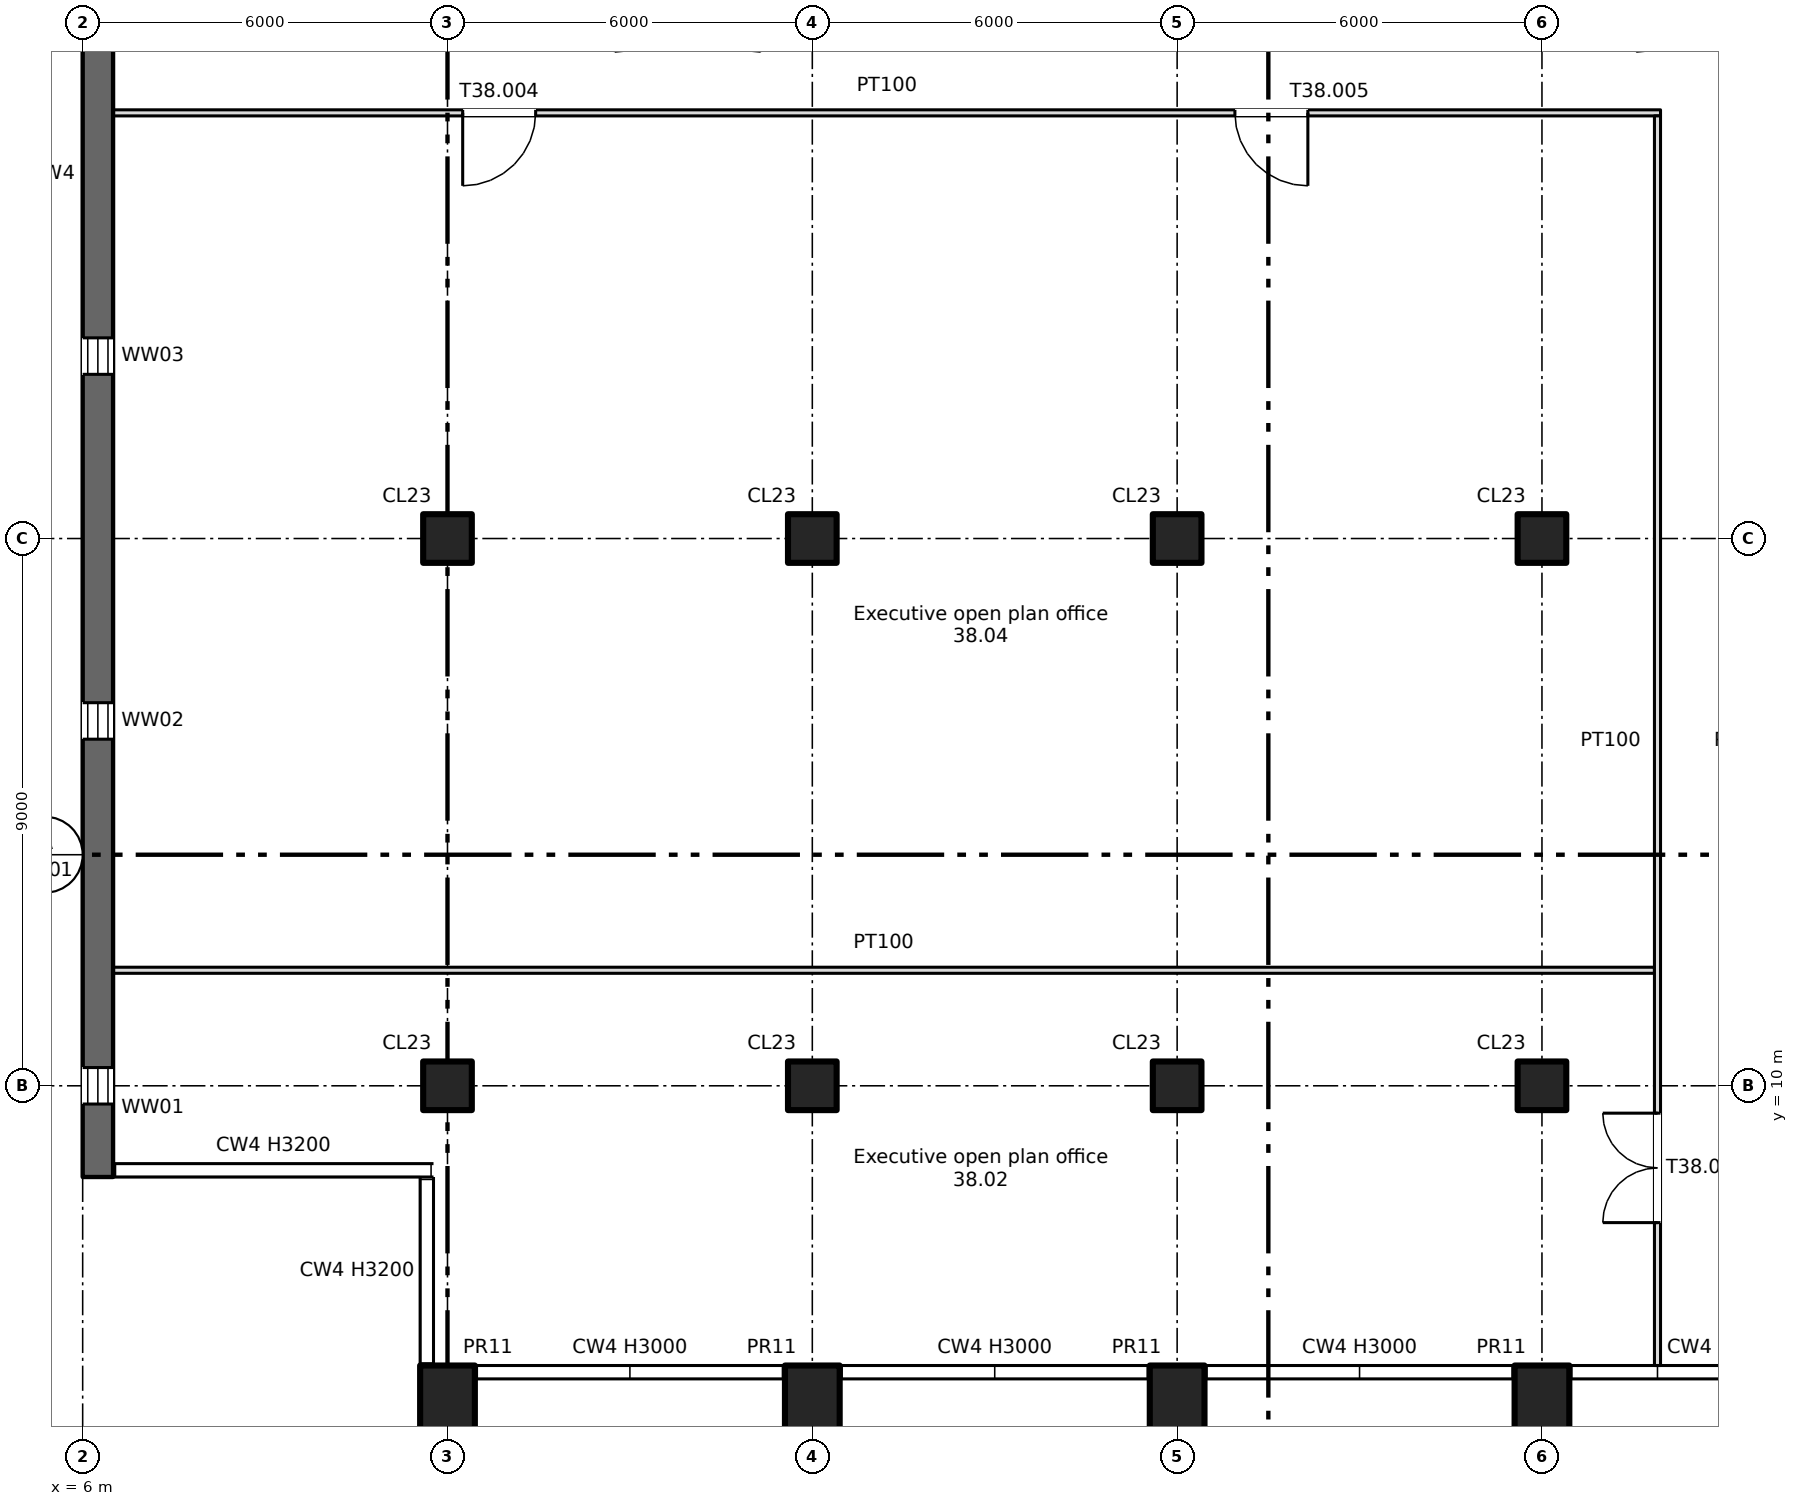
"""IFC4 building model, lengths in metres.
Left out: names, types, materials, properties, quantities, classifications, styles, units other than length and angle.
Written with IfcOpenShell. Run it as: python <this file> out.ifc"""

import sys

from ifc_helpers import new_model, si_unit, direction, frame, frame_2d, origin, origin_2d, place, context, subcontext, project, spatial, rectangle, extrude, element, fill, save


model = new_model("IFC4")
c1 = context("Model", 3, precision=1e-05, world=origin(), true_north=direction((0.0, 1.0)))
c2 = subcontext(c1, "Body", "Model", "MODEL_VIEW")
j1 = project(units=[si_unit("LENGTHUNIT", "METRE"), si_unit("PLANEANGLEUNIT", "RADIAN")], contexts=[c1])
p1 = place(None, origin())
s1 = spatial("IfcSite", under=j1, at=p1, CompositionType="ELEMENT")
p2 = place(p1, origin())
s2 = spatial("IfcBuilding", under=s1, at=p2, CompositionType="ELEMENT")
p3 = place(p2, frame((0.0, 0.0, 262.15)))
s3 = spatial("IfcBuildingStorey", under=s2, at=p3, CompositionType="ELEMENT", Elevation=262.15)
for number, where, z_axis, x_axis in (
    (1, (12.0, 4.7, -0.4), (0.0, 0.0, 1.0), (1.0, 0.0, 0.0)),
    (2, (18.0, 4.7, -0.4), (0.0, 0.0, 1.0), (1.0, 0.0, 0.0)),
    (3, (24.0, 4.7, -0.4), (0.0, 0.0, 1.0), (1.0, 0.0, 0.0)),
    (4, (30.0, 4.7, -0.4), (0.0, 0.0, 1.0), (1.0, 0.0, 0.0)),
):
    element("IfcColumn", number, at=place(p3, frame(where, z_axis=z_axis, x_axis=x_axis)), inside=s3, PredefinedType="COLUMN", context=c2, shape_type="SweptSolid", body=[
        extrude(rectangle(XDim=0.9, YDim=1.4, at=origin_2d()), origin(), (0.0, 0.0, 1.0), 3.6),
    ])
for number, where, z_axis, x_axis in (
    (5, (12.0, 10.0, 0.0), (0.0, 0.0, 1.0), (1.0, 0.0, 0.0)),
    (6, (12.0, 19.0, 0.0), (0.0, 0.0, 1.0), (1.0, 0.0, 0.0)),
    (7, (18.0, 10.0, 0.0), (0.0, 0.0, 1.0), (1.0, 0.0, 0.0)),
    (8, (18.0, 19.0, 0.0), (0.0, 0.0, 1.0), (1.0, 0.0, 0.0)),
    (9, (24.0, 10.0, 0.0), (0.0, 0.0, 1.0), (1.0, 0.0, 0.0)),
    (10, (24.0, 19.0, 0.0), (0.0, 0.0, 1.0), (1.0, 0.0, 0.0)),
    (11, (30.0, 10.0, 0.0), (0.0, 0.0, 1.0), (1.0, 0.0, 0.0)),
    (12, (30.0, 19.0, 0.0), (0.0, 0.0, 1.0), (1.0, 0.0, 0.0)),
):
    element("IfcColumn", number, at=place(p3, frame(where, z_axis=z_axis, x_axis=x_axis)), inside=s3, PredefinedType="COLUMN", context=c2, shape_type="SweptSolid", body=[
        extrude(rectangle(XDim=0.8, YDim=0.8, at=origin_2d()), origin(), (0.0, 0.0, 1.0), 3.2),
    ])
p4 = place(p3, frame((6.25, 8.5, 0.0), z_axis=(0.0, 0.0, 1.0), x_axis=(0.0, 1.0, 0.0)))
e13 = element("IfcWall", 13, at=p4, inside=s3, PredefinedType="SHEAR", context=c2, shape_type="SweptSolid", body=[
    extrude(rectangle(XDim=33.0, YDim=0.5, at=frame_2d((16.5, 0.0))), origin(), (0.0, 0.0, 1.0), 3.2),
])
p5 = place(p4, frame((1.2, 0.0, 0.6)))
e14 = element("IfcOpeningElement", 14, at=p5, cuts=e13, PredefinedType="OPENING", context=c2, shape_type="SweptSolid", body=[
    extrude(rectangle(XDim=0.6, YDim=2.4, at=frame_2d((0.3, 1.2))), frame((0.0, 0.26, 0.0), z_axis=(0.0, -1.0, 0.0), x_axis=(1.0, 0.0, 0.0)), (0.0, 0.0, 1.0), 0.52),
])
p6 = place(p4, frame((7.2, 0.0, 0.6)))
e15 = element("IfcOpeningElement", 15, at=p6, cuts=e13, PredefinedType="OPENING", context=c2, shape_type="SweptSolid", body=[
    extrude(rectangle(XDim=0.6, YDim=2.4, at=frame_2d((0.3, 1.2))), frame((0.0, 0.26, 0.0), z_axis=(0.0, -1.0, 0.0), x_axis=(1.0, 0.0, 0.0)), (0.0, 0.0, 1.0), 0.52),
])
p7 = place(p4, frame((13.2, 0.0, 0.6)))
e16 = element("IfcOpeningElement", 16, at=p7, cuts=e13, PredefinedType="OPENING", context=c2, shape_type="SweptSolid", body=[
    extrude(rectangle(XDim=0.6, YDim=2.4, at=frame_2d((0.3, 1.2))), frame((0.0, 0.26, 0.0), z_axis=(0.0, -1.0, 0.0), x_axis=(1.0, 0.0, 0.0)), (0.0, 0.0, 1.0), 0.52),
])
p8 = place(p3, frame((6.5, 11.9, 0.0), z_axis=(0.0, 0.0, 1.0), x_axis=(1.0, 0.0, 0.0)))
e17 = element("IfcWall", 17, at=p8, inside=s3, PredefinedType="PARTITIONING", context=c2, shape_type="SweptSolid", body=[
    extrude(rectangle(XDim=25.35, YDim=0.1, at=frame_2d((12.675, 0.0))), origin(), (0.0, 0.0, 1.0), 3.2),
])
p9 = place(p3, frame((6.5, 26.0, 0.0), z_axis=(0.0, 0.0, 1.0), x_axis=(1.0, 0.0, 0.0)))
e18 = element("IfcWall", 18, at=p9, inside=s3, PredefinedType="PARTITIONING", context=c2, shape_type="SweptSolid", body=[
    extrude(rectangle(XDim=25.45, YDim=0.1, at=frame_2d((12.725, 0.0))), origin(), (0.0, 0.0, 1.0), 3.2),
])
p10 = place(p9, frame((5.75, 0.0, 0.0)))
e19 = element("IfcOpeningElement", 19, at=p10, cuts=e18, PredefinedType="OPENING", context=c2, shape_type="SweptSolid", body=[
    extrude(rectangle(XDim=1.2, YDim=2.1, at=frame_2d((0.6, 1.05))), frame((0.0, 0.06, 0.0), z_axis=(0.0, -1.0, 0.0), x_axis=(1.0, 0.0, 0.0)), (0.0, 0.0, 1.0), 0.12),
])
p11 = place(p9, frame((18.45, 0.0, 0.0)))
e20 = element("IfcOpeningElement", 20, at=p11, cuts=e18, PredefinedType="OPENING", context=c2, shape_type="SweptSolid", body=[
    extrude(rectangle(XDim=1.2, YDim=2.1, at=frame_2d((0.6, 1.05))), frame((0.0, 0.06, 0.0), z_axis=(0.0, -1.0, 0.0), x_axis=(1.0, 0.0, 0.0)), (0.0, 0.0, 1.0), 0.12),
])
p12 = place(p3, frame((31.9, 5.4, 0.0), z_axis=(0.0, 0.0, 1.0), x_axis=(0.0, 1.0, 0.0)))
e21 = element("IfcWall", 21, at=p12, inside=s3, PredefinedType="PARTITIONING", context=c2, shape_type="SweptSolid", body=[
    extrude(rectangle(XDim=20.55, YDim=0.1, at=frame_2d((10.275, 0.0))), origin(), (0.0, 0.0, 1.0), 3.2),
])
p13 = place(p12, frame((2.35, 0.0, 0.0)))
e22 = element("IfcOpeningElement", 22, at=p13, cuts=e21, PredefinedType="OPENING", context=c2, shape_type="SweptSolid", body=[
    extrude(rectangle(XDim=1.8, YDim=2.1, at=frame_2d((0.9, 1.05))), frame((0.0, 0.06, 0.0), z_axis=(0.0, -1.0, 0.0), x_axis=(1.0, 0.0, 0.0)), (0.0, 0.0, 1.0), 0.12),
])
p14 = place(p5, origin())
e23 = element("IfcWindow", 23, at=p14, inside=s3, PartitioningType="SINGLE_PANEL", PredefinedType="WINDOW", context=c2, shape_type="SweptSolid", body=[
    extrude(rectangle(XDim=0.6, YDim=2.4, at=frame_2d((0.3, 1.2))), frame((0.0, 0.03, 0.0), z_axis=(0.0, -1.0, 0.0), x_axis=(1.0, 0.0, 0.0)), (0.0, 0.0, 1.0), 0.06),
])
fill(e14, e23)
p15 = place(p6, origin())
e24 = element("IfcWindow", 24, at=p15, inside=s3, PartitioningType="SINGLE_PANEL", PredefinedType="WINDOW", context=c2, shape_type="SweptSolid", body=[
    extrude(rectangle(XDim=0.6, YDim=2.4, at=frame_2d((0.3, 1.2))), frame((0.0, 0.03, 0.0), z_axis=(0.0, -1.0, 0.0), x_axis=(1.0, 0.0, 0.0)), (0.0, 0.0, 1.0), 0.06),
])
fill(e15, e24)
p16 = place(p7, origin())
e25 = element("IfcWindow", 25, at=p16, inside=s3, PartitioningType="SINGLE_PANEL", PredefinedType="WINDOW", context=c2, shape_type="SweptSolid", body=[
    extrude(rectangle(XDim=0.6, YDim=2.4, at=frame_2d((0.3, 1.2))), frame((0.0, 0.03, 0.0), z_axis=(0.0, -1.0, 0.0), x_axis=(1.0, 0.0, 0.0)), (0.0, 0.0, 1.0), 0.06),
])
fill(e16, e25)
p17 = place(p13, origin())
e26 = element("IfcDoor", 26, at=p17, inside=s3, OperationType="DOUBLE_DOOR_SINGLE_SWING", PredefinedType="DOOR", context=c2, shape_type="SweptSolid", body=[
    extrude(rectangle(XDim=1.8, YDim=2.1, at=frame_2d((0.9, 1.05))), frame((0.0, 0.025, 0.0), z_axis=(0.0, -1.0, 0.0), x_axis=(1.0, 0.0, 0.0)), (0.0, 0.0, 1.0), 0.05),
])
fill(e22, e26)
p18 = place(p10, origin())
e27 = element("IfcDoor", 27, at=p18, inside=s3, OperationType="SINGLE_SWING_LEFT", PredefinedType="DOOR", context=c2, shape_type="SweptSolid", body=[
    extrude(rectangle(XDim=1.2, YDim=2.1, at=frame_2d((0.6, 1.05))), frame((0.0, 0.025, 0.0), z_axis=(0.0, -1.0, 0.0), x_axis=(1.0, 0.0, 0.0)), (0.0, 0.0, 1.0), 0.05),
])
fill(e19, e27)
p19 = place(p11, origin())
e28 = element("IfcDoor", 28, at=p19, inside=s3, OperationType="SINGLE_SWING_RIGHT", PredefinedType="DOOR", context=c2, shape_type="SweptSolid", body=[
    extrude(rectangle(XDim=1.2, YDim=2.1, at=frame_2d((0.6, 1.05))), frame((0.0, 0.025, 0.0), z_axis=(0.0, -1.0, 0.0), x_axis=(1.0, 0.0, 0.0)), (0.0, 0.0, 1.0), 0.05),
])
fill(e20, e28)
save(model, sys.argv[1])
